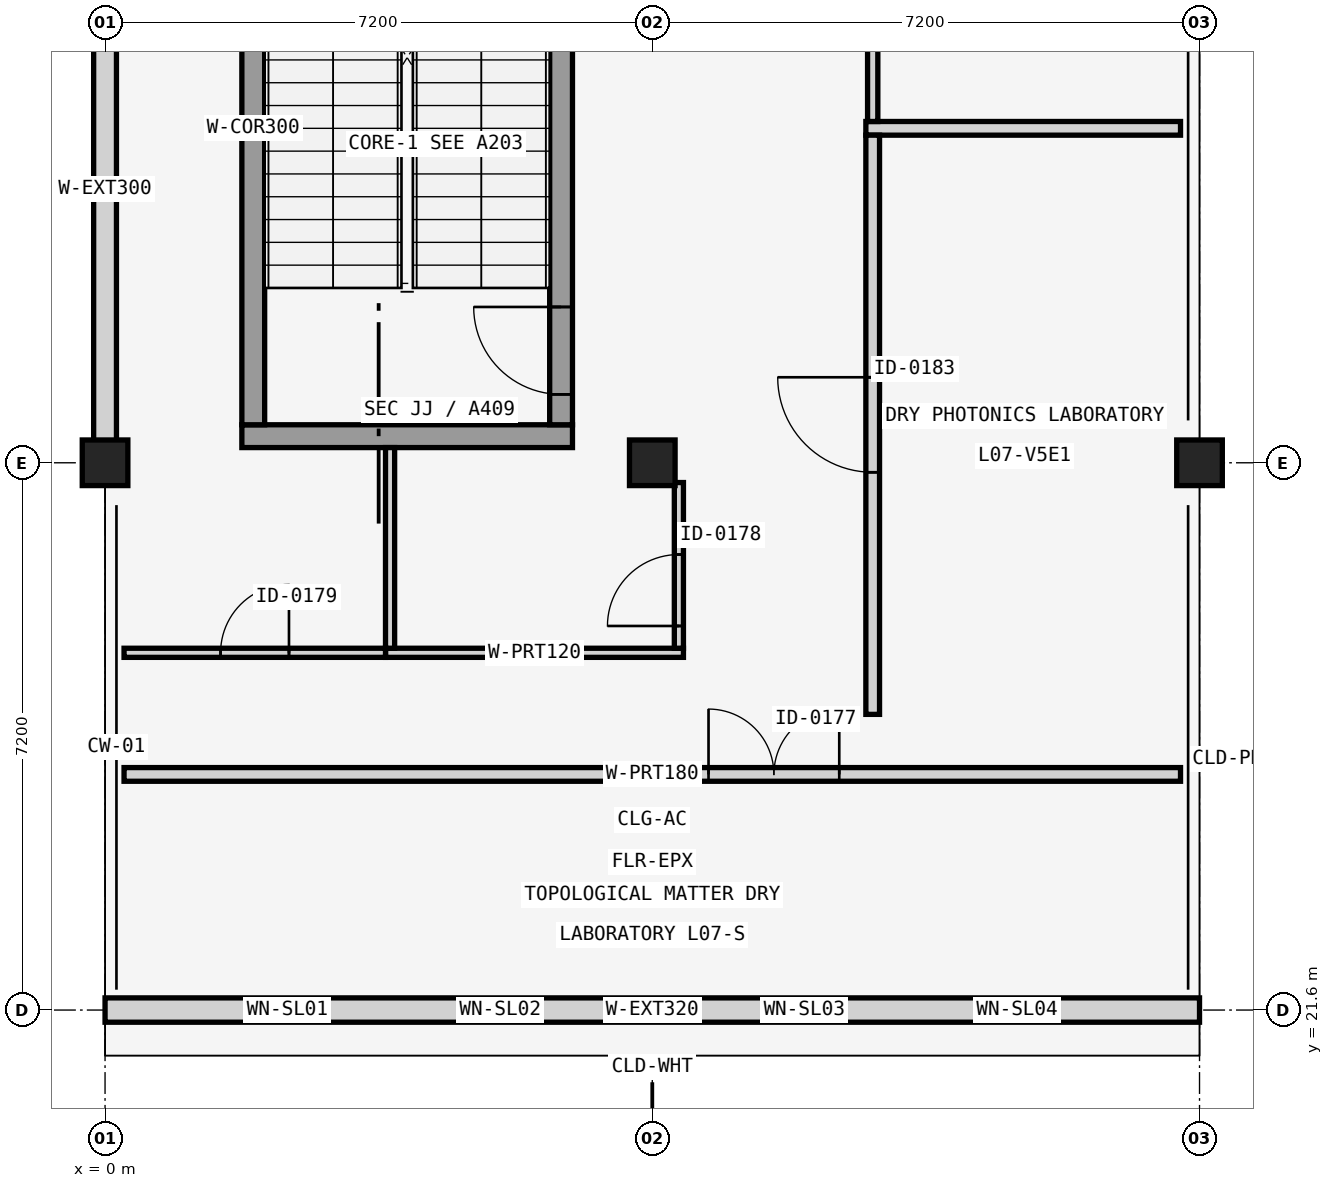
"""IFC4 building model, lengths in metres.
Left out: names, types, materials, properties, quantities, classifications, styles, units other than length and angle.
Written with IfcOpenShell. Run it as: python <this file> out.ifc"""

import sys

from ifc_helpers import new_model, si_unit, direction, frame, frame_2d, origin, origin_2d, place, context, subcontext, project, spatial, rectangle, extrude, element, fill, save


model = new_model("IFC4")
c1 = context("Model", 3, precision=1e-05, world=origin(), true_north=direction((0.0, 1.0)))
c2 = subcontext(c1, "Body", "Model", "MODEL_VIEW")
j1 = project(units=[si_unit("LENGTHUNIT", "METRE"), si_unit("PLANEANGLEUNIT", "RADIAN")], contexts=[c1])
p1 = place(None, origin())
s1 = spatial("IfcSite", under=j1, at=p1, CompositionType="ELEMENT")
p2 = place(p1, origin())
s2 = spatial("IfcBuilding", under=s1, at=p2, CompositionType="ELEMENT")
p3 = place(p2, frame((0.0, 0.0, 29.76)))
s3 = spatial("IfcBuildingStorey", under=s2, at=p3, CompositionType="ELEMENT", Elevation=29.76)
for number, where, z_axis, x_axis in (
    (1, (0.0, 28.8, 0.0), (0.0, 0.0, 1.0), (1.0, 0.0, 0.0)),
    (2, (7.2, 28.8, 0.0), (0.0, 0.0, 1.0), (1.0, 0.0, 0.0)),
    (3, (14.4, 28.8, 0.0), (0.0, 0.0, 1.0), (1.0, 0.0, 0.0)),
):
    element("IfcColumn", number, at=place(p3, frame(where, z_axis=z_axis, x_axis=x_axis)), inside=s3, PredefinedType="COLUMN", context=c2, shape_type="SweptSolid", body=[
        extrude(rectangle(XDim=0.6, YDim=0.6, at=origin_2d()), origin(), (0.0, 0.0, 1.0), 4.16),
    ])
p4 = place(p3, frame((0.0, 21.6, 0.0), z_axis=(0.0, 0.0, 1.0), x_axis=(1.0, 0.0, 0.0)))
e4 = element("IfcWall", 4, at=p4, inside=s3, PredefinedType="SOLIDWALL", context=c2, shape_type="SweptSolid", body=[
    extrude(rectangle(XDim=14.4, YDim=0.32, at=frame_2d((7.2, 0.0))), origin(), (0.0, 0.0, 1.0), 3.01),
])
p5 = place(p4, frame((2.175, 0.0, 0.45)))
e5 = element("IfcOpeningElement", 5, at=p5, cuts=e4, PredefinedType="OPENING", context=c2, shape_type="SweptSolid", body=[
    extrude(rectangle(XDim=0.45, YDim=2.4, at=frame_2d((0.225, 1.2))), frame((0.0, 0.17, 0.0), z_axis=(0.0, -1.0, 0.0), x_axis=(1.0, 0.0, 0.0)), (0.0, 0.0, 1.0), 0.34),
])
p6 = place(p4, frame((4.95, 0.0, 0.45)))
e6 = element("IfcOpeningElement", 6, at=p6, cuts=e4, PredefinedType="OPENING", context=c2, shape_type="SweptSolid", body=[
    extrude(rectangle(XDim=0.5, YDim=2.4, at=frame_2d((0.25, 1.2))), frame((0.0, 0.17, 0.0), z_axis=(0.0, -1.0, 0.0), x_axis=(1.0, 0.0, 0.0)), (0.0, 0.0, 1.0), 0.34),
])
p7 = place(p4, frame((8.925, 0.0, 0.65)))
e7 = element("IfcOpeningElement", 7, at=p7, cuts=e4, PredefinedType="OPENING", context=c2, shape_type="SweptSolid", body=[
    extrude(rectangle(XDim=0.55, YDim=2.2, at=frame_2d((0.275, 1.1))), frame((0.0, 0.17, 0.0), z_axis=(0.0, -1.0, 0.0), x_axis=(1.0, 0.0, 0.0)), (0.0, 0.0, 1.0), 0.34),
])
p8 = place(p4, frame((11.775, 0.0, 0.75)))
e8 = element("IfcOpeningElement", 8, at=p8, cuts=e4, PredefinedType="OPENING", context=c2, shape_type="SweptSolid", body=[
    extrude(rectangle(XDim=0.45, YDim=2.1, at=frame_2d((0.225, 1.05))), frame((0.0, 0.17, 0.0), z_axis=(0.0, -1.0, 0.0), x_axis=(1.0, 0.0, 0.0)), (0.0, 0.0, 1.0), 0.34),
])
p9 = place(p3, frame((0.0, 29.09, 0.0), z_axis=(0.0, 0.0, 1.0), x_axis=(0.0, 1.0, 0.0)))
e9 = element("IfcWall", 9, at=p9, inside=s3, PredefinedType="SOLIDWALL", context=c2, shape_type="SweptSolid", body=[
    extrude(rectangle(XDim=6.62, YDim=0.3, at=frame_2d((3.31, 0.0))), origin(), (0.0, 0.0, 1.0), 3.01),
])
p10 = place(p3, frame((1.8, 29.15, 0.0), z_axis=(0.0, 0.0, 1.0), x_axis=(1.0, 0.0, 0.0)))
e10 = element("IfcWall", 10, at=p10, inside=s3, PredefinedType="SHEAR", context=c2, shape_type="SweptSolid", body=[
    extrude(rectangle(XDim=4.35, YDim=0.3, at=frame_2d((2.175, 0.0))), origin(), (0.0, 0.0, 1.0), 3.81),
])
p11 = place(p3, frame((1.95, 29.3, 0.0), z_axis=(0.0, 0.0, 1.0), x_axis=(0.0, 1.0, 0.0)))
e11 = element("IfcWall", 11, at=p11, inside=s3, PredefinedType="SHEAR", context=c2, shape_type="SweptSolid", body=[
    extrude(rectangle(XDim=7.8, YDim=0.3, at=frame_2d((3.9, 0.0))), origin(), (0.0, 0.0, 1.0), 3.81),
])
p12 = place(p3, frame((6.0, 29.3, 0.0), z_axis=(0.0, 0.0, 1.0), x_axis=(0.0, 1.0, 0.0)))
e12 = element("IfcWall", 12, at=p12, inside=s3, PredefinedType="SHEAR", context=c2, shape_type="SweptSolid", body=[
    extrude(rectangle(XDim=7.8, YDim=0.3, at=frame_2d((3.9, 0.0))), origin(), (0.0, 0.0, 1.0), 3.81),
])
p13 = place(p12, frame((0.4, 0.0, 0.0)))
e13 = element("IfcOpeningElement", 13, at=p13, cuts=e12, PredefinedType="OPENING", context=c2, shape_type="SweptSolid", body=[
    extrude(rectangle(XDim=1.15, YDim=2.2, at=frame_2d((0.575, 1.1))), frame((0.0, 0.16, 0.0), z_axis=(0.0, -1.0, 0.0), x_axis=(1.0, 0.0, 0.0)), (0.0, 0.0, 1.0), 0.32),
])
p14 = place(p3, frame((0.25, 24.7, 0.0), z_axis=(0.0, 0.0, 1.0), x_axis=(1.0, 0.0, 0.0)))
e14 = element("IfcWall", 14, at=p14, inside=s3, PredefinedType="PARTITIONING", context=c2, shape_type="SweptSolid", body=[
    extrude(rectangle(XDim=13.9, YDim=0.18, at=frame_2d((6.95, 0.0))), origin(), (0.0, 0.0, 1.0), 3.01),
])
p15 = place(p14, frame((7.69, 0.0, 0.0)))
e15 = element("IfcOpeningElement", 15, at=p15, cuts=e14, PredefinedType="OPENING", context=c2, shape_type="SweptSolid", body=[
    extrude(rectangle(XDim=1.72, YDim=2.26, at=frame_2d((0.86, 1.13))), frame((0.0, 0.1, 0.0), z_axis=(0.0, -1.0, 0.0), x_axis=(1.0, 0.0, 0.0)), (0.0, 0.0, 1.0), 0.2),
])
p16 = place(p3, frame((3.69, 26.3, 0.0), z_axis=(0.0, 0.0, 1.0), x_axis=(1.0, 0.0, 0.0)))
e16 = element("IfcWall", 16, at=p16, inside=s3, PredefinedType="PARTITIONING", context=c2, shape_type="SweptSolid", body=[
    extrude(rectangle(XDim=3.92, YDim=0.12, at=frame_2d((1.96, 0.0))), origin(), (0.0, 0.0, 1.0), 3.01),
])
p17 = place(p3, frame((3.75, 26.36, 0.0), z_axis=(0.0, 0.0, 1.0), x_axis=(0.0, 1.0, 0.0)))
e17 = element("IfcWall", 17, at=p17, inside=s3, PredefinedType="PARTITIONING", context=c2, shape_type="SweptSolid", body=[
    extrude(rectangle(XDim=2.64, YDim=0.12, at=frame_2d((1.32, 0.0))), origin(), (0.0, 0.0, 1.0), 3.21),
])
p18 = place(p3, frame((7.55, 26.36, 0.0), z_axis=(0.0, 0.0, 1.0), x_axis=(0.0, 1.0, 0.0)))
e18 = element("IfcWall", 18, at=p18, inside=s3, PredefinedType="PARTITIONING", context=c2, shape_type="SweptSolid", body=[
    extrude(rectangle(XDim=2.18, YDim=0.12, at=frame_2d((1.09, 0.0))), origin(), (0.0, 0.0, 1.0), 3.81),
])
p19 = place(p18, frame((0.293, 0.0, 0.0)))
e19 = element("IfcOpeningElement", 19, at=p19, cuts=e18, PredefinedType="OPENING", context=c2, shape_type="SweptSolid", body=[
    extrude(rectangle(XDim=0.94, YDim=2.1, at=frame_2d((0.47, 1.05))), frame((0.0, 0.07, 0.0), z_axis=(0.0, -1.0, 0.0), x_axis=(1.0, 0.0, 0.0)), (0.0, 0.0, 1.0), 0.14),
])
p20 = place(p3, frame((0.25, 26.3, 0.0), z_axis=(0.0, 0.0, 1.0), x_axis=(1.0, 0.0, 0.0)))
e20 = element("IfcWall", 20, at=p20, inside=s3, PredefinedType="PARTITIONING", context=c2, shape_type="SweptSolid", body=[
    extrude(rectangle(XDim=3.44, YDim=0.12, at=frame_2d((1.72, 0.0))), origin(), (0.0, 0.0, 1.0), 3.81),
])
p21 = place(p20, frame((1.27, 0.0, 0.0)))
e21 = element("IfcOpeningElement", 21, at=p21, cuts=e20, PredefinedType="OPENING", context=c2, shape_type="SweptSolid", body=[
    extrude(rectangle(XDim=0.9, YDim=2.1, at=frame_2d((0.45, 1.05))), frame((0.0, 0.07, 0.0), z_axis=(0.0, -1.0, 0.0), x_axis=(1.0, 0.0, 0.0)), (0.0, 0.0, 1.0), 0.14),
])
p22 = place(p3, frame((10.01, 33.2, 0.0), z_axis=(0.0, 0.0, 1.0), x_axis=(1.0, 0.0, 0.0)))
e22 = element("IfcWall", 22, at=p22, inside=s3, PredefinedType="PARTITIONING", context=c2, shape_type="SweptSolid", body=[
    extrude(rectangle(XDim=4.14, YDim=0.18, at=frame_2d((2.07, 0.0))), origin(), (0.0, 0.0, 1.0), 3.81),
])
p23 = place(p3, frame((10.1, 25.49, 0.0), z_axis=(0.0, 0.0, 1.0), x_axis=(0.0, 1.0, 0.0)))
e23 = element("IfcWall", 23, at=p23, inside=s3, PredefinedType="PARTITIONING", context=c2, shape_type="SweptSolid", body=[
    extrude(rectangle(XDim=7.62, YDim=0.18, at=frame_2d((3.81, 0.0))), origin(), (0.0, 0.0, 1.0), 3.21),
])
p24 = place(p23, frame((3.185, 0.0, 0.0)))
e24 = element("IfcOpeningElement", 24, at=p24, cuts=e23, PredefinedType="OPENING", context=c2, shape_type="SweptSolid", body=[
    extrude(rectangle(XDim=1.25, YDim=2.2, at=frame_2d((0.625, 1.1))), frame((0.0, 0.1, 0.0), z_axis=(0.0, -1.0, 0.0), x_axis=(1.0, 0.0, 0.0)), (0.0, 0.0, 1.0), 0.2),
])
p25 = place(p3, frame((10.1, 33.29, 0.0), z_axis=(0.0, 0.0, 1.0), x_axis=(0.0, 1.0, 0.0)))
e25 = element("IfcWall", 25, at=p25, inside=s3, PredefinedType="PARTITIONING", context=c2, shape_type="SweptSolid", body=[
    extrude(rectangle(XDim=15.042, YDim=0.135, at=frame_2d((7.521, 0.0))), origin(), (0.0, 0.0, 1.0), 3.21),
])
p26 = place(p25, frame((6.821, 0.0, 0.0)))
e26 = element("IfcOpeningElement", 26, at=p26, cuts=e25, PredefinedType="OPENING", context=c2, shape_type="SweptSolid", body=[
    extrude(rectangle(XDim=1.4, YDim=2.2, at=frame_2d((0.7, 1.1))), frame((0.0, 0.078, 0.0), z_axis=(0.0, -1.0, 0.0), x_axis=(1.0, 0.0, 0.0)), (0.0, 0.0, 1.0), 0.155),
])
p27 = place(p5, origin())
e27 = element("IfcWindow", 27, at=p27, inside=s3, PartitioningType="SINGLE_PANEL", PredefinedType="WINDOW", context=c2, shape_type="SweptSolid", body=[
    extrude(rectangle(XDim=0.45, YDim=2.4, at=frame_2d((0.225, 1.2))), frame((0.0, 0.03, 0.0), z_axis=(0.0, -1.0, 0.0), x_axis=(1.0, 0.0, 0.0)), (0.0, 0.0, 1.0), 0.06),
])
fill(e5, e27)
p28 = place(p6, origin())
e28 = element("IfcWindow", 28, at=p28, inside=s3, PartitioningType="SINGLE_PANEL", PredefinedType="WINDOW", context=c2, shape_type="SweptSolid", body=[
    extrude(rectangle(XDim=0.5, YDim=2.4, at=frame_2d((0.25, 1.2))), frame((0.0, 0.03, 0.0), z_axis=(0.0, -1.0, 0.0), x_axis=(1.0, 0.0, 0.0)), (0.0, 0.0, 1.0), 0.06),
])
fill(e6, e28)
p29 = place(p7, origin())
e29 = element("IfcWindow", 29, at=p29, inside=s3, PartitioningType="SINGLE_PANEL", PredefinedType="WINDOW", context=c2, shape_type="SweptSolid", body=[
    extrude(rectangle(XDim=0.55, YDim=2.2, at=frame_2d((0.275, 1.1))), frame((0.0, 0.03, 0.0), z_axis=(0.0, -1.0, 0.0), x_axis=(1.0, 0.0, 0.0)), (0.0, 0.0, 1.0), 0.06),
])
fill(e7, e29)
p30 = place(p8, origin())
e30 = element("IfcWindow", 30, at=p30, inside=s3, PartitioningType="SINGLE_PANEL", PredefinedType="WINDOW", context=c2, shape_type="SweptSolid", body=[
    extrude(rectangle(XDim=0.45, YDim=2.1, at=frame_2d((0.225, 1.05))), frame((0.0, 0.03, 0.0), z_axis=(0.0, -1.0, 0.0), x_axis=(1.0, 0.0, 0.0)), (0.0, 0.0, 1.0), 0.06),
])
fill(e8, e30)
p31 = place(p13, origin())
e31 = element("IfcDoor", 31, at=p31, inside=s3, OperationType="SINGLE_SWING_RIGHT", PredefinedType="DOOR", context=c2, shape_type="SweptSolid", body=[
    extrude(rectangle(XDim=1.15, YDim=2.2, at=frame_2d((0.575, 1.1))), frame((0.0, 0.025, 0.0), z_axis=(0.0, -1.0, 0.0), x_axis=(1.0, 0.0, 0.0)), (0.0, 0.0, 1.0), 0.05),
])
fill(e13, e31)
p32 = place(p15, origin())
e32 = element("IfcDoor", 32, at=p32, inside=s3, OperationType="DOUBLE_DOOR_SINGLE_SWING", PredefinedType="DOOR", context=c2, shape_type="SweptSolid", body=[
    extrude(rectangle(XDim=1.72, YDim=2.26, at=frame_2d((0.86, 1.13))), frame((0.0, 0.025, 0.0), z_axis=(0.0, -1.0, 0.0), x_axis=(1.0, 0.0, 0.0)), (0.0, 0.0, 1.0), 0.05),
])
fill(e15, e32)
p33 = place(p19, frame((0.94, 0.0, 0.0), z_axis=(0.0, 0.0, 1.0), x_axis=(-1.0, 0.0, 0.0)))
e33 = element("IfcDoor", 33, at=p33, inside=s3, OperationType="SINGLE_SWING_LEFT", PredefinedType="DOOR", context=c2, shape_type="SweptSolid", body=[
    extrude(rectangle(XDim=0.94, YDim=2.1, at=frame_2d((0.47, 1.05))), frame((0.0, 0.025, 0.0), z_axis=(0.0, -1.0, 0.0), x_axis=(1.0, 0.0, 0.0)), (0.0, 0.0, 1.0), 0.05),
])
fill(e19, e33)
p34 = place(p21, origin())
e34 = element("IfcDoor", 34, at=p34, inside=s3, OperationType="SINGLE_SWING_RIGHT", PredefinedType="DOOR", context=c2, shape_type="SweptSolid", body=[
    extrude(rectangle(XDim=0.9, YDim=2.1, at=frame_2d((0.45, 1.05))), frame((0.0, 0.025, 0.0), z_axis=(0.0, -1.0, 0.0), x_axis=(1.0, 0.0, 0.0)), (0.0, 0.0, 1.0), 0.05),
])
fill(e21, e34)
p35 = place(p24, origin())
e35 = element("IfcDoor", 35, at=p35, inside=s3, OperationType="SINGLE_SWING_RIGHT", PredefinedType="DOOR", context=c2, shape_type="SweptSolid", body=[
    extrude(rectangle(XDim=1.25, YDim=2.2, at=frame_2d((0.625, 1.1))), frame((0.0, 0.025, 0.0), z_axis=(0.0, -1.0, 0.0), x_axis=(1.0, 0.0, 0.0)), (0.0, 0.0, 1.0), 0.05),
])
fill(e24, e35)
save(model, sys.argv[1])
